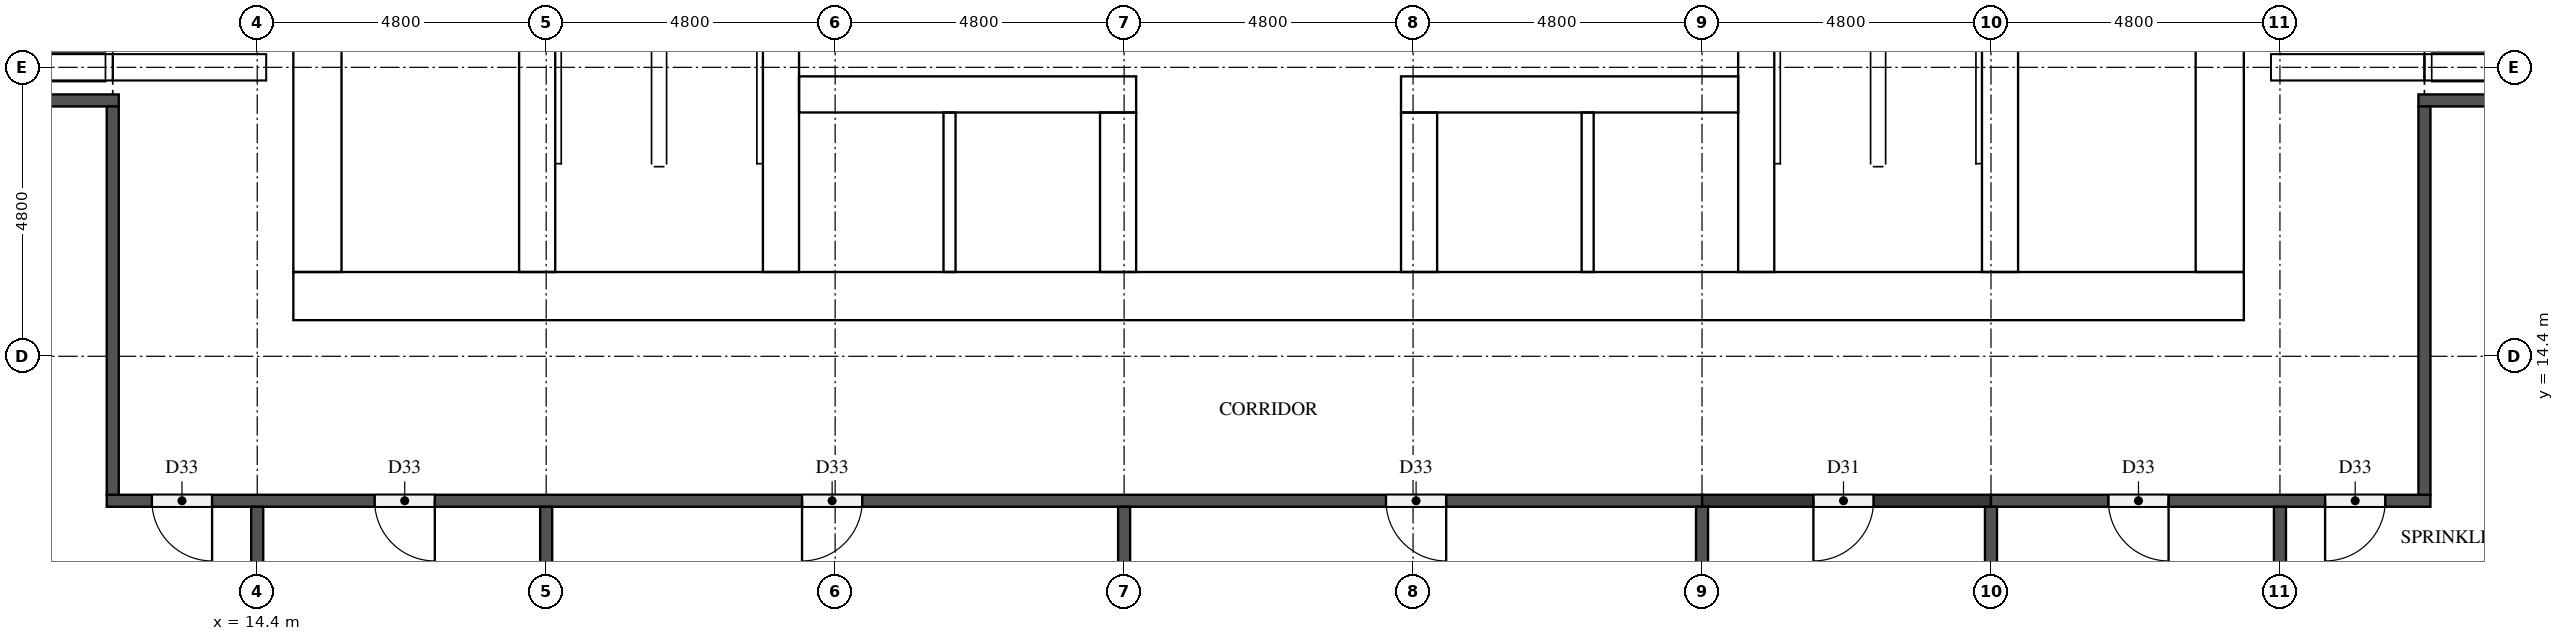
"""IFC4 building model, lengths in metres.
Left out: names, types, materials, properties, quantities, classifications, styles, units other than length and angle.
Written with IfcOpenShell. Run it as: python <this file> out.ifc"""

import sys

from ifc_helpers import new_model, si_unit, direction, frame, frame_2d, origin, place, context, subcontext, project, spatial, rectangle, extrude, element, fill, save


model = new_model("IFC4")
c1 = context("Model", 3, precision=1e-05, world=origin(), true_north=direction((0.0, 1.0)))
c2 = subcontext(c1, "Body", "Model", "MODEL_VIEW")
j1 = project(units=[si_unit("LENGTHUNIT", "METRE"), si_unit("PLANEANGLEUNIT", "RADIAN")], contexts=[c1])
p1 = place(None, origin())
s1 = spatial("IfcSite", under=j1, at=p1, CompositionType="ELEMENT")
p2 = place(p1, origin())
s2 = spatial("IfcBuilding", under=s1, at=p2, CompositionType="ELEMENT")
p3 = place(p2, frame((0.0, 0.0, 113.7)))
s3 = spatial("IfcBuildingStorey", under=s2, at=p3, CompositionType="ELEMENT", Elevation=113.7)
p4 = place(p3, frame((15.0, 15.4, 0.0), z_axis=(0.0, 0.0, 1.0), x_axis=(1.0, 0.0, 0.0)))
e1 = element("IfcWall", 1, at=p4, inside=s3, PredefinedType="SHEAR", context=c2, shape_type="SweptSolid", body=[
    extrude(rectangle(XDim=32.4, YDim=0.8, at=frame_2d((16.2, 0.0))), origin(), (0.0, 0.0, 1.0), 5.1),
])
p5 = place(p4, frame((15.3, 0.0, 0.0)))
e2 = element("IfcOpeningElement", 2, at=p5, cuts=e1, PredefinedType="OPENING", context=c2, shape_type="SweptSolid", body=[
    extrude(rectangle(XDim=1.8, YDim=2.1, at=frame_2d((0.9, 1.05))), frame((0.0, 0.41, 0.0), z_axis=(0.0, -1.0, 0.0), x_axis=(1.0, 0.0, 0.0)), (0.0, 0.0, 1.0), 0.82),
])
p6 = place(p3, frame((15.4, 15.8, 0.0), z_axis=(0.0, 0.0, 1.0), x_axis=(0.0, 1.0, 0.0)))
e3 = element("IfcWall", 3, at=p6, inside=s3, PredefinedType="SHEAR", context=c2, shape_type="SweptSolid", body=[
    extrude(rectangle(XDim=21.2, YDim=0.8, at=frame_2d((10.6, 0.0))), origin(), (0.0, 0.0, 1.0), 5.1),
])
p7 = place(p6, frame((4.96, 0.0, 0.0)))
e4 = element("IfcOpeningElement", 4, at=p7, cuts=e3, PredefinedType="OPENING", context=c2, shape_type="SweptSolid", body=[
    extrude(rectangle(XDim=1.2, YDim=2.1, at=frame_2d((0.6, 1.05))), frame((0.0, 0.41, 0.0), z_axis=(0.0, -1.0, 0.0), x_axis=(1.0, 0.0, 0.0)), (0.0, 0.0, 1.0), 0.82),
])
p8 = place(p3, frame((47.0, 15.8, 0.0), z_axis=(0.0, 0.0, 1.0), x_axis=(0.0, 1.0, 0.0)))
e5 = element("IfcWall", 5, at=p8, inside=s3, PredefinedType="SHEAR", context=c2, shape_type="SweptSolid", body=[
    extrude(rectangle(XDim=21.2, YDim=0.8, at=frame_2d((10.6, 0.0))), origin(), (0.0, 0.0, 1.0), 5.1),
])
p9 = place(p8, frame((10.3, 0.0, 0.0)))
e6 = element("IfcOpeningElement", 6, at=p9, cuts=e5, PredefinedType="OPENING", context=c2, shape_type="SweptSolid", body=[
    extrude(rectangle(XDim=1.2, YDim=2.1, at=frame_2d((0.6, 1.05))), frame((0.0, 0.41, 0.0), z_axis=(0.0, -1.0, 0.0), x_axis=(1.0, 0.0, 0.0)), (0.0, 0.0, 1.0), 0.82),
])
p10 = place(p3, frame((19.05, 15.8, 0.0), z_axis=(0.0, 0.0, 1.0), x_axis=(0.0, 1.0, 0.0)))
e7 = element("IfcWall", 7, at=p10, inside=s3, PredefinedType="SHEAR", context=c2, shape_type="SweptSolid", body=[
    extrude(rectangle(XDim=15.15, YDim=0.6, at=frame_2d((7.575, 0.0))), origin(), (0.0, 0.0, 1.0), 5.1),
])
p11 = place(p10, frame((9.65, 0.0, 0.0)))
e8 = element("IfcOpeningElement", 8, at=p11, cuts=e7, PredefinedType="OPENING", context=c2, shape_type="SweptSolid", body=[
    extrude(rectangle(XDim=1.1, YDim=2.1, at=frame_2d((0.55, 1.05))), frame((0.0, 0.31, 0.0), z_axis=(0.0, -1.0, 0.0), x_axis=(1.0, 0.0, 0.0)), (0.0, 0.0, 1.0), 0.62),
])
p12 = place(p10, frame((13.15, 0.0, 0.0)))
e9 = element("IfcOpeningElement", 9, at=p12, cuts=e7, PredefinedType="OPENING", context=c2, shape_type="SweptSolid", body=[
    extrude(rectangle(XDim=1.1, YDim=2.1, at=frame_2d((0.55, 1.05))), frame((0.0, 0.31, 0.0), z_axis=(0.0, -1.0, 0.0), x_axis=(1.0, 0.0, 0.0)), (0.0, 0.0, 1.0), 0.62),
])
p13 = place(p10, frame((0.4, 0.0, 0.0)))
e10 = element("IfcOpeningElement", 10, at=p13, cuts=e7, PredefinedType="OPENING", context=c2, shape_type="SweptSolid", body=[
    extrude(rectangle(XDim=1.2, YDim=2.1, at=frame_2d((0.6, 1.05))), frame((0.0, 0.31, 0.0), z_axis=(0.0, -1.0, 0.0), x_axis=(1.0, 0.0, 0.0)), (0.0, 0.0, 1.0), 0.62),
])
p14 = place(p3, frame((23.1, 15.8, 0.0), z_axis=(0.0, 0.0, 1.0), x_axis=(0.0, 1.0, 0.0)))
e11 = element("IfcWall", 11, at=p14, inside=s3, PredefinedType="SHEAR", context=c2, shape_type="SweptSolid", body=[
    extrude(rectangle(XDim=21.2, YDim=0.6, at=frame_2d((10.6, 0.0))), origin(), (0.0, 0.0, 1.0), 5.1),
])
p15 = place(p3, frame((39.3, 15.8, 0.0), z_axis=(0.0, 0.0, 1.0), x_axis=(0.0, 1.0, 0.0)))
e12 = element("IfcWall", 12, at=p15, inside=s3, PredefinedType="SHEAR", context=c2, shape_type="SweptSolid", body=[
    extrude(rectangle(XDim=8.45, YDim=0.6, at=frame_2d((4.225, 0.0))), origin(), (0.0, 0.0, 1.0), 5.1),
])
p16 = place(p3, frame((43.35, 15.8, 0.0), z_axis=(0.0, 0.0, 1.0), x_axis=(0.0, 1.0, 0.0)))
e13 = element("IfcWall", 13, at=p16, inside=s3, PredefinedType="SHEAR", context=c2, shape_type="SweptSolid", body=[
    extrude(rectangle(XDim=8.45, YDim=0.6, at=frame_2d((4.225, 0.0))), origin(), (0.0, 0.0, 1.0), 5.1),
])
p17 = place(p16, frame((0.4, 0.0, 0.0)))
e14 = element("IfcOpeningElement", 14, at=p17, cuts=e13, PredefinedType="OPENING", context=c2, shape_type="SweptSolid", body=[
    extrude(rectangle(XDim=1.2, YDim=2.1, at=frame_2d((0.6, 1.05))), frame((0.0, 0.31, 0.0), z_axis=(0.0, -1.0, 0.0), x_axis=(1.0, 0.0, 0.0)), (0.0, 0.0, 1.0), 0.62),
])
p18 = place(p3, frame((23.4, 18.75, 0.0), z_axis=(0.0, 0.0, 1.0), x_axis=(1.0, 0.0, 0.0)))
e15 = element("IfcWall", 15, at=p18, inside=s3, PredefinedType="SHEAR", context=c2, shape_type="SweptSolid", body=[
    extrude(rectangle(XDim=5.6, YDim=0.6, at=frame_2d((2.8, 0.0))), origin(), (0.0, 0.0, 1.0), 5.1),
])
p19 = place(p18, frame((0.65, 0.0, 0.0)))
e16 = element("IfcOpeningElement", 16, at=p19, cuts=e15, PredefinedType="OPENING", context=c2, shape_type="SweptSolid", body=[
    extrude(rectangle(XDim=1.1, YDim=2.1, at=frame_2d((0.55, 1.05))), frame((0.0, 0.31, 0.0), z_axis=(0.0, -1.0, 0.0), x_axis=(1.0, 0.0, 0.0)), (0.0, 0.0, 1.0), 0.62),
])
p20 = place(p18, frame((3.25, 0.0, 0.0)))
e17 = element("IfcOpeningElement", 17, at=p20, cuts=e15, PredefinedType="OPENING", context=c2, shape_type="SweptSolid", body=[
    extrude(rectangle(XDim=1.1, YDim=2.1, at=frame_2d((0.55, 1.05))), frame((0.0, 0.31, 0.0), z_axis=(0.0, -1.0, 0.0), x_axis=(1.0, 0.0, 0.0)), (0.0, 0.0, 1.0), 0.62),
])
p21 = place(p3, frame((33.4, 18.75, 0.0), z_axis=(0.0, 0.0, 1.0), x_axis=(1.0, 0.0, 0.0)))
e18 = element("IfcWall", 18, at=p21, inside=s3, PredefinedType="SHEAR", context=c2, shape_type="SweptSolid", body=[
    extrude(rectangle(XDim=5.6, YDim=0.6, at=frame_2d((2.8, 0.0))), origin(), (0.0, 0.0, 1.0), 5.1),
])
p22 = place(p21, frame((1.25, 0.0, 0.0)))
e19 = element("IfcOpeningElement", 19, at=p22, cuts=e18, PredefinedType="OPENING", context=c2, shape_type="SweptSolid", body=[
    extrude(rectangle(XDim=1.1, YDim=2.1, at=frame_2d((0.55, 1.05))), frame((0.0, 0.31, 0.0), z_axis=(0.0, -1.0, 0.0), x_axis=(1.0, 0.0, 0.0)), (0.0, 0.0, 1.0), 0.62),
])
p23 = place(p21, frame((3.85, 0.0, 0.0)))
e20 = element("IfcOpeningElement", 20, at=p23, cuts=e18, PredefinedType="OPENING", context=c2, shape_type="SweptSolid", body=[
    extrude(rectangle(XDim=1.1, YDim=2.1, at=frame_2d((0.55, 1.05))), frame((0.0, 0.31, 0.0), z_axis=(0.0, -1.0, 0.0), x_axis=(1.0, 0.0, 0.0)), (0.0, 0.0, 1.0), 0.62),
])
for number, where, z_axis, x_axis in (
    (21, (28.7, 15.8, 0.0), (0.0, 0.0, 1.0), (0.0, 1.0, 0.0)),
    (22, (33.7, 15.8, 0.0), (0.0, 0.0, 1.0), (0.0, 1.0, 0.0)),
):
    element("IfcWall", number, at=place(p3, frame(where, z_axis=z_axis, x_axis=x_axis)), inside=s3, PredefinedType="SHEAR", context=c2, shape_type="SweptSolid", body=[
        extrude(rectangle(XDim=2.65, YDim=0.6, at=frame_2d((1.325, 0.0))), origin(), (0.0, 0.0, 1.0), 5.1),
    ])
for number, where, z_axis, x_axis in (
    (23, (25.9, 15.8, 0.0), (0.0, 0.0, 1.0), (0.0, 1.0, 0.0)),
    (24, (36.5, 15.8, 0.0), (0.0, 0.0, 1.0), (0.0, 1.0, 0.0)),
):
    element("IfcWall", number, at=place(p3, frame(where, z_axis=z_axis, x_axis=x_axis)), inside=s3, PredefinedType="SOLIDWALL", context=c2, shape_type="SweptSolid", body=[
        extrude(rectangle(XDim=2.65, YDim=0.2, at=frame_2d((1.325, 0.0))), origin(), (0.0, 0.0, 1.0), 5.1),
    ])
p24 = place(p3, frame((43.2, 12.0, 0.0), z_axis=(0.0, 0.0, 1.0), x_axis=(-1.0, 0.0, 0.0)))
e25 = element("IfcWall", 25, at=p24, inside=s3, PredefinedType="PARTITIONING", context=c2, shape_type="SweptSolid", body=[
    extrude(rectangle(XDim=4.8, YDim=0.2, at=frame_2d((2.4, 0.0))), origin(), (0.0, 0.0, 1.0), 5.1),
])
p25 = place(p24, frame((1.95, 0.0, 0.0)))
e26 = element("IfcOpeningElement", 26, at=p25, cuts=e25, PredefinedType="OPENING", context=c2, shape_type="SweptSolid", body=[
    extrude(rectangle(XDim=1.0, YDim=2.1, at=frame_2d((0.5, 1.05))), frame((0.0, 0.11, 0.0), z_axis=(0.0, -1.0, 0.0), x_axis=(1.0, 0.0, 0.0)), (0.0, 0.0, 1.0), 0.22),
])
p26 = place(p3, frame((38.4, 12.0, 0.0), z_axis=(0.0, 0.0, 1.0), x_axis=(-1.0, 0.0, 0.0)))
e27 = element("IfcWall", 27, at=p26, inside=s3, PredefinedType="PARTITIONING", context=c2, shape_type="SweptSolid", body=[
    extrude(rectangle(XDim=26.5, YDim=0.2, at=frame_2d((13.25, 0.0))), origin(), (0.0, 0.0, 1.0), 5.1),
])
p27 = place(p26, frame((24.75, 0.0, 0.0)))
e28 = element("IfcOpeningElement", 28, at=p27, cuts=e27, PredefinedType="OPENING", context=c2, shape_type="SweptSolid", body=[
    extrude(rectangle(XDim=1.0, YDim=2.1, at=frame_2d((0.5, 1.05))), frame((0.0, 0.11, 0.0), z_axis=(0.0, -1.0, 0.0), x_axis=(1.0, 0.0, 0.0)), (0.0, 0.0, 1.0), 0.22),
])
p28 = place(p26, frame((21.05, 0.0, 0.0)))
e29 = element("IfcOpeningElement", 29, at=p28, cuts=e27, PredefinedType="OPENING", context=c2, shape_type="SweptSolid", body=[
    extrude(rectangle(XDim=1.0, YDim=2.1, at=frame_2d((0.5, 1.05))), frame((0.0, 0.11, 0.0), z_axis=(0.0, -1.0, 0.0), x_axis=(1.0, 0.0, 0.0)), (0.0, 0.0, 1.0), 0.22),
])
p29 = place(p26, frame((13.95, 0.0, 0.0)))
e30 = element("IfcOpeningElement", 30, at=p29, cuts=e27, PredefinedType="OPENING", context=c2, shape_type="SweptSolid", body=[
    extrude(rectangle(XDim=1.0, YDim=2.1, at=frame_2d((0.5, 1.05))), frame((0.0, 0.11, 0.0), z_axis=(0.0, -1.0, 0.0), x_axis=(1.0, 0.0, 0.0)), (0.0, 0.0, 1.0), 0.22),
])
p30 = place(p26, frame((4.25, 0.0, 0.0)))
e31 = element("IfcOpeningElement", 31, at=p30, cuts=e27, PredefinedType="OPENING", context=c2, shape_type="SweptSolid", body=[
    extrude(rectangle(XDim=1.0, YDim=2.1, at=frame_2d((0.5, 1.05))), frame((0.0, 0.11, 0.0), z_axis=(0.0, -1.0, 0.0), x_axis=(1.0, 0.0, 0.0)), (0.0, 0.0, 1.0), 0.22),
])
p31 = place(p3, frame((50.5, 12.0, 0.0), z_axis=(0.0, 0.0, 1.0), x_axis=(-1.0, 0.0, 0.0)))
e32 = element("IfcWall", 32, at=p31, inside=s3, PredefinedType="PARTITIONING", context=c2, shape_type="SweptSolid", body=[
    extrude(rectangle(XDim=7.3, YDim=0.2, at=frame_2d((3.65, 0.0))), origin(), (0.0, 0.0, 1.0), 5.1),
])
p32 = place(p31, frame((4.35, 0.0, 0.0)))
e33 = element("IfcOpeningElement", 33, at=p32, cuts=e32, PredefinedType="OPENING", context=c2, shape_type="SweptSolid", body=[
    extrude(rectangle(XDim=1.0, YDim=2.1, at=frame_2d((0.5, 1.05))), frame((0.0, 0.11, 0.0), z_axis=(0.0, -1.0, 0.0), x_axis=(1.0, 0.0, 0.0)), (0.0, 0.0, 1.0), 0.22),
])
p33 = place(p31, frame((0.75, 0.0, 0.0)))
e34 = element("IfcOpeningElement", 34, at=p33, cuts=e32, PredefinedType="OPENING", context=c2, shape_type="SweptSolid", body=[
    extrude(rectangle(XDim=1.0, YDim=2.1, at=frame_2d((0.5, 1.05))), frame((0.0, 0.11, 0.0), z_axis=(0.0, -1.0, 0.0), x_axis=(1.0, 0.0, 0.0)), (0.0, 0.0, 1.0), 0.22),
])
p34 = place(p3, frame((2.3, 18.65, 0.0), z_axis=(0.0, 0.0, 1.0), x_axis=(1.0, 0.0, 0.0)))
e35 = element("IfcWall", 35, at=p34, inside=s3, PredefinedType="PARTITIONING", context=c2, shape_type="SweptSolid", body=[
    extrude(rectangle(XDim=9.8, YDim=0.2, at=frame_2d((4.9, 0.0))), origin(), (0.0, 0.0, 1.0), 5.1),
])
p35 = place(p3, frame((50.3, 18.65, 0.0), z_axis=(0.0, 0.0, 1.0), x_axis=(1.0, 0.0, 0.0)))
e36 = element("IfcWall", 36, at=p35, inside=s3, PredefinedType="PARTITIONING", context=c2, shape_type="SweptSolid", body=[
    extrude(rectangle(XDim=5.0, YDim=0.2, at=frame_2d((2.5, 0.0))), origin(), (0.0, 0.0, 1.0), 5.1),
])
p36 = place(p3, frame((12.0, 12.1, 0.0), z_axis=(0.0, 0.0, 1.0), x_axis=(0.0, 1.0, 0.0)))
e37 = element("IfcWall", 37, at=p36, inside=s3, PredefinedType="PARTITIONING", context=c2, shape_type="SweptSolid", body=[
    extrude(rectangle(XDim=6.45, YDim=0.2, at=frame_2d((3.225, 0.0))), origin(), (0.0, 0.0, 1.0), 5.1),
])
for number, where, z_axis, x_axis in (
    (38, (14.4, 7.1, 0.0), (0.0, 0.0, 1.0), (0.0, 1.0, 0.0)),
    (39, (19.2, 7.1, 0.0), (0.0, 0.0, 1.0), (0.0, 1.0, 0.0)),
    (40, (28.8, 7.1, 0.0), (0.0, 0.0, 1.0), (0.0, 1.0, 0.0)),
    (41, (38.4, 7.1, 0.0), (0.0, 0.0, 1.0), (0.0, 1.0, 0.0)),
    (42, (43.2, 7.1, 0.0), (0.0, 0.0, 1.0), (0.0, 1.0, 0.0)),
    (43, (48.0, 7.1, 0.0), (0.0, 0.0, 1.0), (0.0, 1.0, 0.0)),
):
    element("IfcWall", number, at=place(p3, frame(where, z_axis=z_axis, x_axis=x_axis)), inside=s3, PredefinedType="PARTITIONING", context=c2, shape_type="SweptSolid", body=[
        extrude(rectangle(XDim=4.8, YDim=0.2, at=frame_2d((2.4, 0.0))), origin(), (0.0, 0.0, 1.0), 5.1),
    ])
p37 = place(p3, frame((50.4, 12.1, 0.0), z_axis=(0.0, 0.0, 1.0), x_axis=(0.0, 1.0, 0.0)))
e44 = element("IfcWall", 44, at=p37, inside=s3, PredefinedType="PARTITIONING", context=c2, shape_type="SweptSolid", body=[
    extrude(rectangle(XDim=6.45, YDim=0.2, at=frame_2d((3.225, 0.0))), origin(), (0.0, 0.0, 1.0), 5.1),
])
p38 = place(p19, origin())
e45 = element("IfcDoor", 45, at=p38, inside=s3, OperationType="DOUBLE_DOOR_SLIDING", PredefinedType="DOOR", context=c2, shape_type="SweptSolid", body=[
    extrude(rectangle(XDim=1.1, YDim=2.1, at=frame_2d((0.55, 1.05))), frame((0.0, 0.025, 0.0), z_axis=(0.0, -1.0, 0.0), x_axis=(1.0, 0.0, 0.0)), (0.0, 0.0, 1.0), 0.05),
])
fill(e16, e45)
p39 = place(p20, origin())
e46 = element("IfcDoor", 46, at=p39, inside=s3, OperationType="DOUBLE_DOOR_SLIDING", PredefinedType="DOOR", context=c2, shape_type="SweptSolid", body=[
    extrude(rectangle(XDim=1.1, YDim=2.1, at=frame_2d((0.55, 1.05))), frame((0.0, 0.025, 0.0), z_axis=(0.0, -1.0, 0.0), x_axis=(1.0, 0.0, 0.0)), (0.0, 0.0, 1.0), 0.05),
])
fill(e17, e46)
p40 = place(p22, origin())
e47 = element("IfcDoor", 47, at=p40, inside=s3, OperationType="DOUBLE_DOOR_SLIDING", PredefinedType="DOOR", context=c2, shape_type="SweptSolid", body=[
    extrude(rectangle(XDim=1.1, YDim=2.1, at=frame_2d((0.55, 1.05))), frame((0.0, 0.025, 0.0), z_axis=(0.0, -1.0, 0.0), x_axis=(1.0, 0.0, 0.0)), (0.0, 0.0, 1.0), 0.05),
])
fill(e19, e47)
p41 = place(p23, origin())
e48 = element("IfcDoor", 48, at=p41, inside=s3, OperationType="DOUBLE_DOOR_SLIDING", PredefinedType="DOOR", context=c2, shape_type="SweptSolid", body=[
    extrude(rectangle(XDim=1.1, YDim=2.1, at=frame_2d((0.55, 1.05))), frame((0.0, 0.025, 0.0), z_axis=(0.0, -1.0, 0.0), x_axis=(1.0, 0.0, 0.0)), (0.0, 0.0, 1.0), 0.05),
])
fill(e20, e48)
p42 = place(p13, frame((1.2, 0.0, 0.0), z_axis=(0.0, 0.0, 1.0), x_axis=(-1.0, 0.0, 0.0)))
e49 = element("IfcDoor", 49, at=p42, inside=s3, OperationType="SINGLE_SWING_LEFT", PredefinedType="DOOR", context=c2, shape_type="SweptSolid", body=[
    extrude(rectangle(XDim=1.2, YDim=2.1, at=frame_2d((0.6, 1.05))), frame((0.0, 0.025, 0.0), z_axis=(0.0, -1.0, 0.0), x_axis=(1.0, 0.0, 0.0)), (0.0, 0.0, 1.0), 0.05),
])
fill(e10, e49)
p43 = place(p17, origin())
e50 = element("IfcDoor", 50, at=p43, inside=s3, OperationType="SINGLE_SWING_RIGHT", PredefinedType="DOOR", context=c2, shape_type="SweptSolid", body=[
    extrude(rectangle(XDim=1.2, YDim=2.1, at=frame_2d((0.6, 1.05))), frame((0.0, 0.025, 0.0), z_axis=(0.0, -1.0, 0.0), x_axis=(1.0, 0.0, 0.0)), (0.0, 0.0, 1.0), 0.05),
])
fill(e14, e50)
p44 = place(p5, frame((1.8, 0.0, 0.0), z_axis=(0.0, 0.0, 1.0), x_axis=(-1.0, 0.0, 0.0)))
e51 = element("IfcDoor", 51, at=p44, inside=s3, OperationType="DOUBLE_DOOR_SINGLE_SWING", PredefinedType="DOOR", context=c2, shape_type="SweptSolid", body=[
    extrude(rectangle(XDim=1.8, YDim=2.1, at=frame_2d((0.9, 1.05))), frame((0.0, 0.025, 0.0), z_axis=(0.0, -1.0, 0.0), x_axis=(1.0, 0.0, 0.0)), (0.0, 0.0, 1.0), 0.05),
])
fill(e2, e51)
p45 = place(p27, origin())
e52 = element("IfcDoor", 52, at=p45, inside=s3, OperationType="SINGLE_SWING_LEFT", PredefinedType="DOOR", context=c2, shape_type="SweptSolid", body=[
    extrude(rectangle(XDim=1.0, YDim=2.1, at=frame_2d((0.5, 1.05))), frame((0.0, 0.025, 0.0), z_axis=(0.0, -1.0, 0.0), x_axis=(1.0, 0.0, 0.0)), (0.0, 0.0, 1.0), 0.05),
])
fill(e28, e52)
p46 = place(p28, origin())
e53 = element("IfcDoor", 53, at=p46, inside=s3, OperationType="SINGLE_SWING_LEFT", PredefinedType="DOOR", context=c2, shape_type="SweptSolid", body=[
    extrude(rectangle(XDim=1.0, YDim=2.1, at=frame_2d((0.5, 1.05))), frame((0.0, 0.025, 0.0), z_axis=(0.0, -1.0, 0.0), x_axis=(1.0, 0.0, 0.0)), (0.0, 0.0, 1.0), 0.05),
])
fill(e29, e53)
p47 = place(p29, origin())
e54 = element("IfcDoor", 54, at=p47, inside=s3, OperationType="SINGLE_SWING_RIGHT", PredefinedType="DOOR", context=c2, shape_type="SweptSolid", body=[
    extrude(rectangle(XDim=1.0, YDim=2.1, at=frame_2d((0.5, 1.05))), frame((0.0, 0.025, 0.0), z_axis=(0.0, -1.0, 0.0), x_axis=(1.0, 0.0, 0.0)), (0.0, 0.0, 1.0), 0.05),
])
fill(e30, e54)
p48 = place(p30, origin())
e55 = element("IfcDoor", 55, at=p48, inside=s3, OperationType="SINGLE_SWING_LEFT", PredefinedType="DOOR", context=c2, shape_type="SweptSolid", body=[
    extrude(rectangle(XDim=1.0, YDim=2.1, at=frame_2d((0.5, 1.05))), frame((0.0, 0.025, 0.0), z_axis=(0.0, -1.0, 0.0), x_axis=(1.0, 0.0, 0.0)), (0.0, 0.0, 1.0), 0.05),
])
fill(e31, e55)
p49 = place(p25, origin())
e56 = element("IfcDoor", 56, at=p49, inside=s3, OperationType="SINGLE_SWING_RIGHT", PredefinedType="DOOR", context=c2, shape_type="SweptSolid", body=[
    extrude(rectangle(XDim=1.0, YDim=2.1, at=frame_2d((0.5, 1.05))), frame((0.0, 0.025, 0.0), z_axis=(0.0, -1.0, 0.0), x_axis=(1.0, 0.0, 0.0)), (0.0, 0.0, 1.0), 0.05),
])
fill(e26, e56)
p50 = place(p32, origin())
e57 = element("IfcDoor", 57, at=p50, inside=s3, OperationType="SINGLE_SWING_LEFT", PredefinedType="DOOR", context=c2, shape_type="SweptSolid", body=[
    extrude(rectangle(XDim=1.0, YDim=2.1, at=frame_2d((0.5, 1.05))), frame((0.0, 0.025, 0.0), z_axis=(0.0, -1.0, 0.0), x_axis=(1.0, 0.0, 0.0)), (0.0, 0.0, 1.0), 0.05),
])
fill(e33, e57)
p51 = place(p33, origin())
e58 = element("IfcDoor", 58, at=p51, inside=s3, OperationType="SINGLE_SWING_RIGHT", PredefinedType="DOOR", context=c2, shape_type="SweptSolid", body=[
    extrude(rectangle(XDim=1.0, YDim=2.1, at=frame_2d((0.5, 1.05))), frame((0.0, 0.025, 0.0), z_axis=(0.0, -1.0, 0.0), x_axis=(1.0, 0.0, 0.0)), (0.0, 0.0, 1.0), 0.05),
])
fill(e34, e58)
save(model, sys.argv[1])
